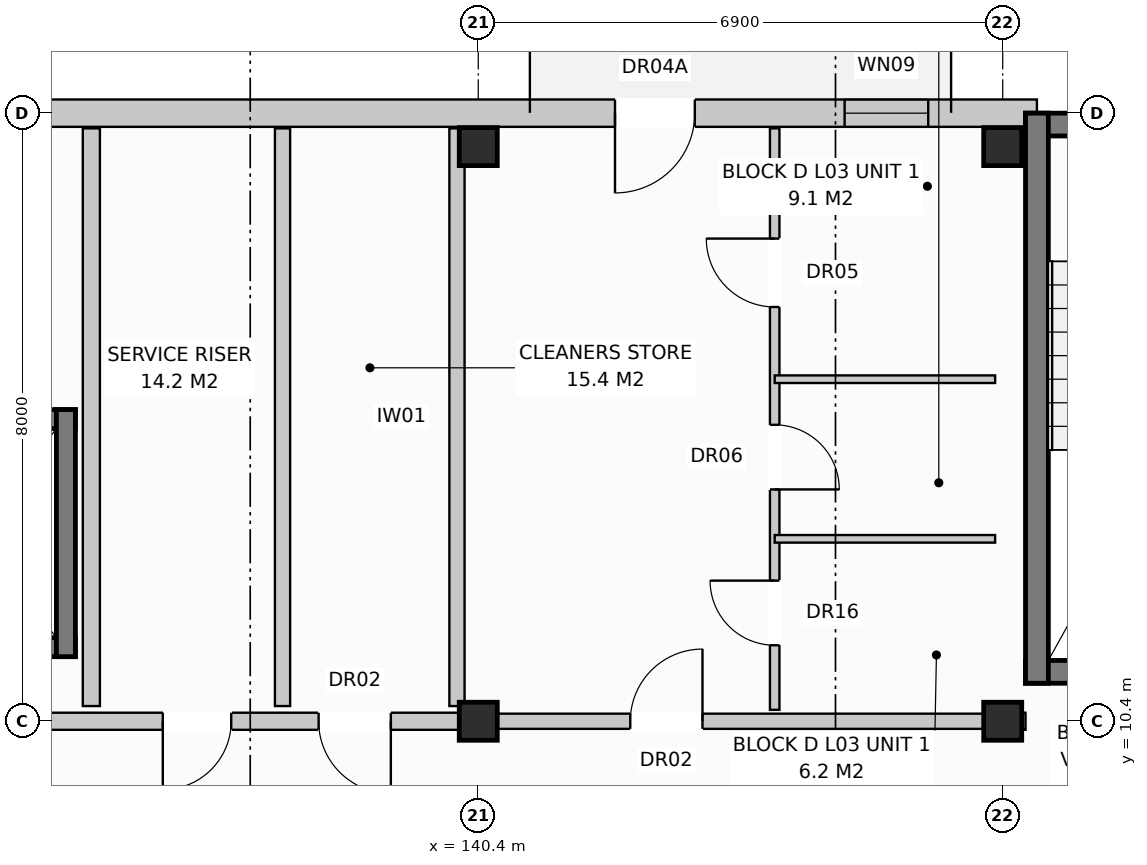
"""IFC4 building model, lengths in metres.
Left out: names, types, materials, properties, quantities, classifications, styles, units other than length and angle.
Written with IfcOpenShell. Run it as: python <this file> out.ifc"""

import sys

from ifc_helpers import new_model, si_unit, direction, frame, frame_2d, origin, origin_with_axes, origin_2d, place, context, subcontext, project, spatial, rectangle, extrude, element, fill, save


model = new_model("IFC4")
c1 = context("Model", 3, precision=1e-05, world=origin(), true_north=direction((0.0, 1.0)))
c2 = subcontext(c1, "Body", "Model", "MODEL_VIEW")
j1 = project(units=[si_unit("LENGTHUNIT", "METRE"), si_unit("PLANEANGLEUNIT", "RADIAN")], contexts=[c1])
p1 = place(None, origin())
s1 = spatial("IfcSite", under=j1, at=p1, CompositionType="ELEMENT")
p2 = place(p1, origin())
s2 = spatial("IfcBuilding", under=s1, at=p2, CompositionType="ELEMENT")
p3 = place(p2, frame((0.0, 0.0, 11.2)))
s3 = spatial("IfcBuildingStorey", under=s2, at=p3, CompositionType="ELEMENT", Elevation=11.2)
for number, where, z_axis, x_axis in (
    (1, (140.4, 10.4, 0.0), (0.0, 0.0, 1.0), (1.0, 0.0, 0.0)),
    (2, (140.4, 17.96, 0.0), (0.0, 0.0, 1.0), (1.0, 0.0, 0.0)),
    (3, (147.3, 10.4, 0.0), (0.0, 0.0, 1.0), (1.0, 0.0, 0.0)),
    (4, (147.3, 17.96, 0.0), (0.0, 0.0, 1.0), (1.0, 0.0, 0.0)),
):
    element("IfcColumn", number, at=place(p3, frame(where, z_axis=z_axis, x_axis=x_axis)), inside=s3, PredefinedType="COLUMN", context=c2, shape_type="SweptSolid", body=[
        extrude(rectangle(XDim=0.5, YDim=0.5, at=origin_2d()), origin(), (0.0, 0.0, 1.0), 3.2),
    ])
p4 = place(p3, frame((130.25, 18.4, 0.0), z_axis=(0.0, 0.0, 1.0), x_axis=(1.0, 0.0, 0.0)))
e5 = element("IfcWall", 5, at=p4, inside=s3, PredefinedType="STANDARD", context=c2, shape_type="SweptSolid", body=[
    extrude(rectangle(XDim=17.5, YDim=0.36, at=frame_2d((8.75, 0.0))), origin(), (0.0, 0.0, 1.0), 2.94),
])
p5 = place(p4, frame((11.949, 0.0, 0.0)))
e6 = element("IfcOpeningElement", 6, at=p5, cuts=e5, PredefinedType="OPENING", context=c2, shape_type="SweptSolid", body=[
    extrude(rectangle(XDim=1.05, YDim=2.12, at=frame_2d((0.525, 1.06))), frame((0.0, 0.192, 0.0), z_axis=(0.0, -1.0, 0.0), x_axis=(1.0, 0.0, 0.0)), (0.0, 0.0, 1.0), 0.384),
])
p6 = place(p4, frame((14.97, 0.0, 0.72)))
e7 = element("IfcOpeningElement", 7, at=p6, cuts=e5, PredefinedType="OPENING", context=c2, shape_type="SweptSolid", body=[
    extrude(rectangle(XDim=1.1, YDim=1.5, at=frame_2d((0.55, 0.75))), frame((0.0, 0.192, 0.0), z_axis=(0.0, -1.0, 0.0), x_axis=(1.0, 0.0, 0.0)), (0.0, 0.0, 1.0), 0.384),
])
p7 = place(p3, frame((132.5, 14.375, 0.0), z_axis=(0.0, 0.0, 1.0), x_axis=(1.0, 0.0, 0.0)))
e8 = element("IfcWall", 8, at=p7, inside=s3, PredefinedType="SHEAR", context=c2, shape_type="SweptSolid", body=[
    extrude(rectangle(XDim=2.6, YDim=0.25, at=frame_2d((1.3, 0.0))), origin(), (0.0, 0.0, 1.0), 2.94),
])
p8 = place(p7, frame((0.875, 0.0, 0.0)))
e9 = element("IfcOpeningElement", 9, at=p8, cuts=e8, PredefinedType="OPENING", context=c2, shape_type="SweptSolid", body=[
    extrude(rectangle(XDim=1.1, YDim=2.1, at=frame_2d((0.55, 1.05))), frame((0.0, 0.137, 0.0), z_axis=(0.0, -1.0, 0.0), x_axis=(1.0, 0.0, 0.0)), (0.0, 0.0, 1.0), 0.274),
])
p9 = place(p3, frame((132.5, 11.375, 0.0), z_axis=(0.0, 0.0, 1.0), x_axis=(1.0, 0.0, 0.0)))
e10 = element("IfcWall", 10, at=p9, inside=s3, PredefinedType="SHEAR", context=c2, shape_type="SweptSolid", body=[
    extrude(rectangle(XDim=2.6, YDim=0.25, at=frame_2d((1.3, 0.0))), origin(), (0.0, 0.0, 1.0), 2.94),
])
p10 = place(p3, frame((134.975, 11.25, 0.0), z_axis=(0.0, 0.0, 1.0), x_axis=(0.0, 1.0, 0.0)))
e11 = element("IfcWall", 11, at=p10, inside=s3, PredefinedType="SHEAR", context=c2, shape_type="SweptSolid", body=[
    extrude(rectangle(XDim=3.25, YDim=0.25, at=frame_2d((1.625, 0.0))), origin(), (0.0, 0.0, 1.0), 2.94),
])
p11 = place(p3, frame((135.31, 10.6, 0.0), z_axis=(0.0, 0.0, 1.0), x_axis=(0.0, 1.0, 0.0)))
e12 = element("IfcWall", 12, at=p11, inside=s3, PredefinedType="PARTITIONING", context=c2, shape_type="SweptSolid", body=[
    extrude(rectangle(XDim=7.6, YDim=0.225, at=frame_2d((3.8, 0.0))), origin(), (0.0, 0.0, 1.0), 2.59),
])
for number, where, z_axis, x_axis in (
    (13, (137.825, 10.6, 0.0), (0.0, 0.0, 1.0), (0.0, 1.0, 0.0)),
    (14, (140.12, 10.6, 0.0), (0.0, 0.0, 1.0), (0.0, 1.0, 0.0)),
):
    element("IfcWall", number, at=place(p3, frame(where, z_axis=z_axis, x_axis=x_axis)), inside=s3, PredefinedType="PARTITIONING", context=c2, shape_type="SweptSolid", body=[
        extrude(rectangle(XDim=7.6, YDim=0.2, at=frame_2d((3.8, 0.0))), origin(), (0.0, 0.0, 1.0), 2.94),
    ])
p12 = place(p3, frame((130.4, 10.4, 0.0), z_axis=(0.0, 0.0, 1.0), x_axis=(1.0, 0.0, 0.0)))
e15 = element("IfcWall", 15, at=p12, inside=s3, PredefinedType="PARTITIONING", context=c2, shape_type="SweptSolid", body=[
    extrude(rectangle(XDim=10.0, YDim=0.225, at=frame_2d((5.0, 0.0))), origin(), (0.0, 0.0, 1.0), 2.38),
])
p13 = place(p12, frame((0.475, 0.0, 0.0)))
e16 = element("IfcOpeningElement", 16, at=p13, cuts=e15, PredefinedType="OPENING", context=c2, shape_type="SweptSolid", body=[
    extrude(rectangle(XDim=1.1, YDim=2.15, at=frame_2d((0.55, 1.075))), frame((0.0, 0.125, 0.0), z_axis=(0.0, -1.0, 0.0), x_axis=(1.0, 0.0, 0.0)), (0.0, 0.0, 1.0), 0.249),
])
p14 = place(p12, frame((5.85, 0.0, 0.0)))
e17 = element("IfcOpeningElement", 17, at=p14, cuts=e15, PredefinedType="OPENING", context=c2, shape_type="SweptSolid", body=[
    extrude(rectangle(XDim=0.9, YDim=2.1, at=frame_2d((0.45, 1.05))), frame((0.0, 0.125, 0.0), z_axis=(0.0, -1.0, 0.0), x_axis=(1.0, 0.0, 0.0)), (0.0, 0.0, 1.0), 0.249),
])
p15 = place(p12, frame((7.9, 0.0, 0.0)))
e18 = element("IfcOpeningElement", 18, at=p15, cuts=e15, PredefinedType="OPENING", context=c2, shape_type="SweptSolid", body=[
    extrude(rectangle(XDim=0.95, YDim=2.15, at=frame_2d((0.475, 1.075))), frame((0.0, 0.125, 0.0), z_axis=(0.0, -1.0, 0.0), x_axis=(1.0, 0.0, 0.0)), (0.0, 0.0, 1.0), 0.249),
])
for number, where, z_axis, x_axis in (
    (19, (147.6, 18.25, 0.0), (0.0, 0.0, 1.0), (1.0, 0.0, 0.0)),
    (20, (147.6, 11.05, 0.0), (0.0, 0.0, 1.0), (1.0, 0.0, 0.0)),
):
    element("IfcWall", number, at=place(p3, frame(where, z_axis=z_axis, x_axis=x_axis)), inside=s3, PredefinedType="SHEAR", context=c2, shape_type="SweptSolid", body=[
        extrude(rectangle(XDim=3.5, YDim=0.3, at=frame_2d((1.75, 0.0))), origin(), (0.0, 0.0, 1.0), 2.94),
    ])
p16 = place(p3, frame((147.75, 10.9, 0.0), z_axis=(0.0, 0.0, 1.0), x_axis=(0.0, 1.0, 0.0)))
e21 = element("IfcWall", 21, at=p16, inside=s3, PredefinedType="SHEAR", context=c2, shape_type="SweptSolid", body=[
    extrude(rectangle(XDim=7.5, YDim=0.3, at=frame_2d((3.75, 0.0))), origin(), (0.0, 0.0, 1.0), 2.94),
])
p17 = place(p3, frame((147.3, 10.4, 0.0), z_axis=(0.0, 0.0, 1.0), x_axis=(1.0, 0.0, 0.0)))
e22 = element("IfcWall", 22, at=p17, inside=s3, PredefinedType="PARTITIONING", context=c2, shape_type="SweptSolid", body=[
    extrude(rectangle(XDim=0.3, YDim=0.225, at=frame_2d((0.15, 0.0))), origin(), (0.0, 0.0, 1.0), 2.94),
])
p18 = place(p3, frame((140.4, 10.4, 0.0), z_axis=(0.0, 0.0, 1.0), x_axis=(1.0, 0.0, 0.0)))
e23 = element("IfcWall", 23, at=p18, inside=s3, PredefinedType="PARTITIONING", context=c2, shape_type="SweptSolid", body=[
    extrude(rectangle(XDim=6.9, YDim=0.2, at=frame_2d((3.45, 0.0))), origin(), (0.0, 0.0, 1.0), 2.38),
])
p19 = place(p18, frame((2.0, 0.0, 0.0)))
e24 = element("IfcOpeningElement", 24, at=p19, cuts=e23, PredefinedType="OPENING", context=c2, shape_type="SweptSolid", body=[
    extrude(rectangle(XDim=0.95, YDim=2.15, at=frame_2d((0.475, 1.075))), frame((0.0, 0.112, 0.0), z_axis=(0.0, -1.0, 0.0), x_axis=(1.0, 0.0, 0.0)), (0.0, 0.0, 1.0), 0.224),
])
p20 = place(p3, frame((144.3, 10.55, 0.0), z_axis=(0.0, 0.0, 1.0), x_axis=(0.0, 1.0, 0.0)))
e25 = element("IfcWall", 25, at=p20, inside=s3, PredefinedType="PARTITIONING", context=c2, shape_type="SweptSolid", body=[
    extrude(rectangle(XDim=7.65, YDim=0.125, at=frame_2d((3.825, 0.0))), origin(), (0.0, 0.0, 1.0), 2.94),
])
p21 = place(p20, frame((0.85, 0.0, 0.0)))
e26 = element("IfcOpeningElement", 26, at=p21, cuts=e25, PredefinedType="OPENING", context=c2, shape_type="SweptSolid", body=[
    extrude(rectangle(XDim=0.85, YDim=2.1, at=frame_2d((0.425, 1.05))), frame((0.0, 0.074, 0.0), z_axis=(0.0, -1.0, 0.0), x_axis=(1.0, 0.0, 0.0)), (0.0, 0.0, 1.0), 0.149),
])
p22 = place(p20, frame((2.9, 0.0, 0.0)))
e27 = element("IfcOpeningElement", 27, at=p22, cuts=e25, PredefinedType="OPENING", context=c2, shape_type="SweptSolid", body=[
    extrude(rectangle(XDim=0.85, YDim=2.05, at=frame_2d((0.425, 1.025))), frame((0.0, 0.074, 0.0), z_axis=(0.0, -1.0, 0.0), x_axis=(1.0, 0.0, 0.0)), (0.0, 0.0, 1.0), 0.149),
])
p23 = place(p20, frame((5.3, 0.0, 0.0)))
e28 = element("IfcOpeningElement", 28, at=p23, cuts=e25, PredefinedType="OPENING", context=c2, shape_type="SweptSolid", body=[
    extrude(rectangle(XDim=0.9, YDim=2.1, at=frame_2d((0.45, 1.05))), frame((0.0, 0.074, 0.0), z_axis=(0.0, -1.0, 0.0), x_axis=(1.0, 0.0, 0.0)), (0.0, 0.0, 1.0), 0.149),
])
for number, where, z_axis, x_axis in (
    (29, (144.3, 12.8, 0.0), (0.0, 0.0, 1.0), (1.0, 0.0, 0.0)),
    (30, (144.3, 14.9, 0.0), (0.0, 0.0, 1.0), (1.0, 0.0, 0.0)),
):
    element("IfcWall", number, at=place(p3, frame(where, z_axis=z_axis, x_axis=x_axis)), inside=s3, PredefinedType="PARTITIONING", context=c2, shape_type="SweptSolid", body=[
        extrude(rectangle(XDim=2.9, YDim=0.1, at=frame_2d((1.45, 0.0))), origin(), (0.0, 0.0, 1.0), 2.94),
    ])
p24 = place(p5, frame((1.05, 0.0, 0.0), z_axis=(0.0, 0.0, 1.0), x_axis=(-1.0, 0.0, 0.0)))
e31 = element("IfcDoor", 31, at=p24, inside=s3, OperationType="SINGLE_SWING_LEFT", PredefinedType="DOOR", context=c2, shape_type="SweptSolid", body=[
    extrude(rectangle(XDim=1.05, YDim=2.12, at=frame_2d((0.525, 1.06))), frame((0.0, 0.025, 0.0), z_axis=(0.0, -1.0, 0.0), x_axis=(1.0, 0.0, 0.0)), (0.0, 0.0, 1.0), 0.05),
])
fill(e6, e31)
p25 = place(p6, origin_with_axes())
e32 = element("IfcWindow", 32, at=p25, inside=s3, PartitioningType="SINGLE_PANEL", PredefinedType="WINDOW", context=c2, shape_type="SweptSolid", body=[
    extrude(rectangle(XDim=1.1, YDim=1.5, at=frame_2d((0.55, 0.75))), frame((0.0, 0.03, 0.0), z_axis=(0.0, -1.0, 0.0), x_axis=(1.0, 0.0, 0.0)), (0.0, 0.0, 1.0), 0.06),
])
fill(e7, e32)
p26 = place(p14, frame((0.9, 0.0, 0.0), z_axis=(0.0, 0.0, 1.0), x_axis=(-1.0, 0.0, 0.0)))
e33 = element("IfcDoor", 33, at=p26, inside=s3, OperationType="SINGLE_SWING_LEFT", PredefinedType="DOOR", context=c2, shape_type="SweptSolid", body=[
    extrude(rectangle(XDim=0.9, YDim=2.1, at=frame_2d((0.45, 1.05))), frame((0.0, 0.025, 0.0), z_axis=(0.0, -1.0, 0.0), x_axis=(1.0, 0.0, 0.0)), (0.0, 0.0, 1.0), 0.05),
])
fill(e17, e33)
p27 = place(p15, frame((0.95, 0.0, 0.0), z_axis=(0.0, 0.0, 1.0), x_axis=(-1.0, 0.0, 0.0)))
e34 = element("IfcDoor", 34, at=p27, inside=s3, OperationType="SINGLE_SWING_RIGHT", PredefinedType="DOOR", context=c2, shape_type="SweptSolid", body=[
    extrude(rectangle(XDim=0.95, YDim=2.15, at=frame_2d((0.475, 1.075))), frame((0.0, 0.025, 0.0), z_axis=(0.0, -1.0, 0.0), x_axis=(1.0, 0.0, 0.0)), (0.0, 0.0, 1.0), 0.05),
])
fill(e18, e34)
p28 = place(p19, origin_with_axes())
e35 = element("IfcDoor", 35, at=p28, inside=s3, OperationType="SINGLE_SWING_RIGHT", PredefinedType="DOOR", context=c2, shape_type="SweptSolid", body=[
    extrude(rectangle(XDim=0.95, YDim=2.15, at=frame_2d((0.475, 1.075))), frame((0.0, 0.025, 0.0), z_axis=(0.0, -1.0, 0.0), x_axis=(1.0, 0.0, 0.0)), (0.0, 0.0, 1.0), 0.05),
])
fill(e24, e35)
p29 = place(p21, origin_with_axes())
e36 = element("IfcDoor", 36, at=p29, inside=s3, OperationType="SINGLE_SWING_RIGHT", PredefinedType="DOOR", context=c2, shape_type="SweptSolid", body=[
    extrude(rectangle(XDim=0.85, YDim=2.1, at=frame_2d((0.425, 1.05))), frame((0.0, 0.025, 0.0), z_axis=(0.0, -1.0, 0.0), x_axis=(1.0, 0.0, 0.0)), (0.0, 0.0, 1.0), 0.05),
])
fill(e26, e36)
p30 = place(p22, frame((0.85, 0.0, 0.0), z_axis=(0.0, 0.0, 1.0), x_axis=(-1.0, 0.0, 0.0)))
e37 = element("IfcDoor", 37, at=p30, inside=s3, OperationType="SINGLE_SWING_LEFT", PredefinedType="DOOR", context=c2, shape_type="SweptSolid", body=[
    extrude(rectangle(XDim=0.85, YDim=2.05, at=frame_2d((0.425, 1.025))), frame((0.0, 0.025, 0.0), z_axis=(0.0, -1.0, 0.0), x_axis=(1.0, 0.0, 0.0)), (0.0, 0.0, 1.0), 0.05),
])
fill(e27, e37)
p31 = place(p23, origin_with_axes())
e38 = element("IfcDoor", 38, at=p31, inside=s3, OperationType="SINGLE_SWING_RIGHT", PredefinedType="DOOR", context=c2, shape_type="SweptSolid", body=[
    extrude(rectangle(XDim=0.9, YDim=2.1, at=frame_2d((0.45, 1.05))), frame((0.0, 0.025, 0.0), z_axis=(0.0, -1.0, 0.0), x_axis=(1.0, 0.0, 0.0)), (0.0, 0.0, 1.0), 0.05),
])
fill(e28, e38)
save(model, sys.argv[1])
